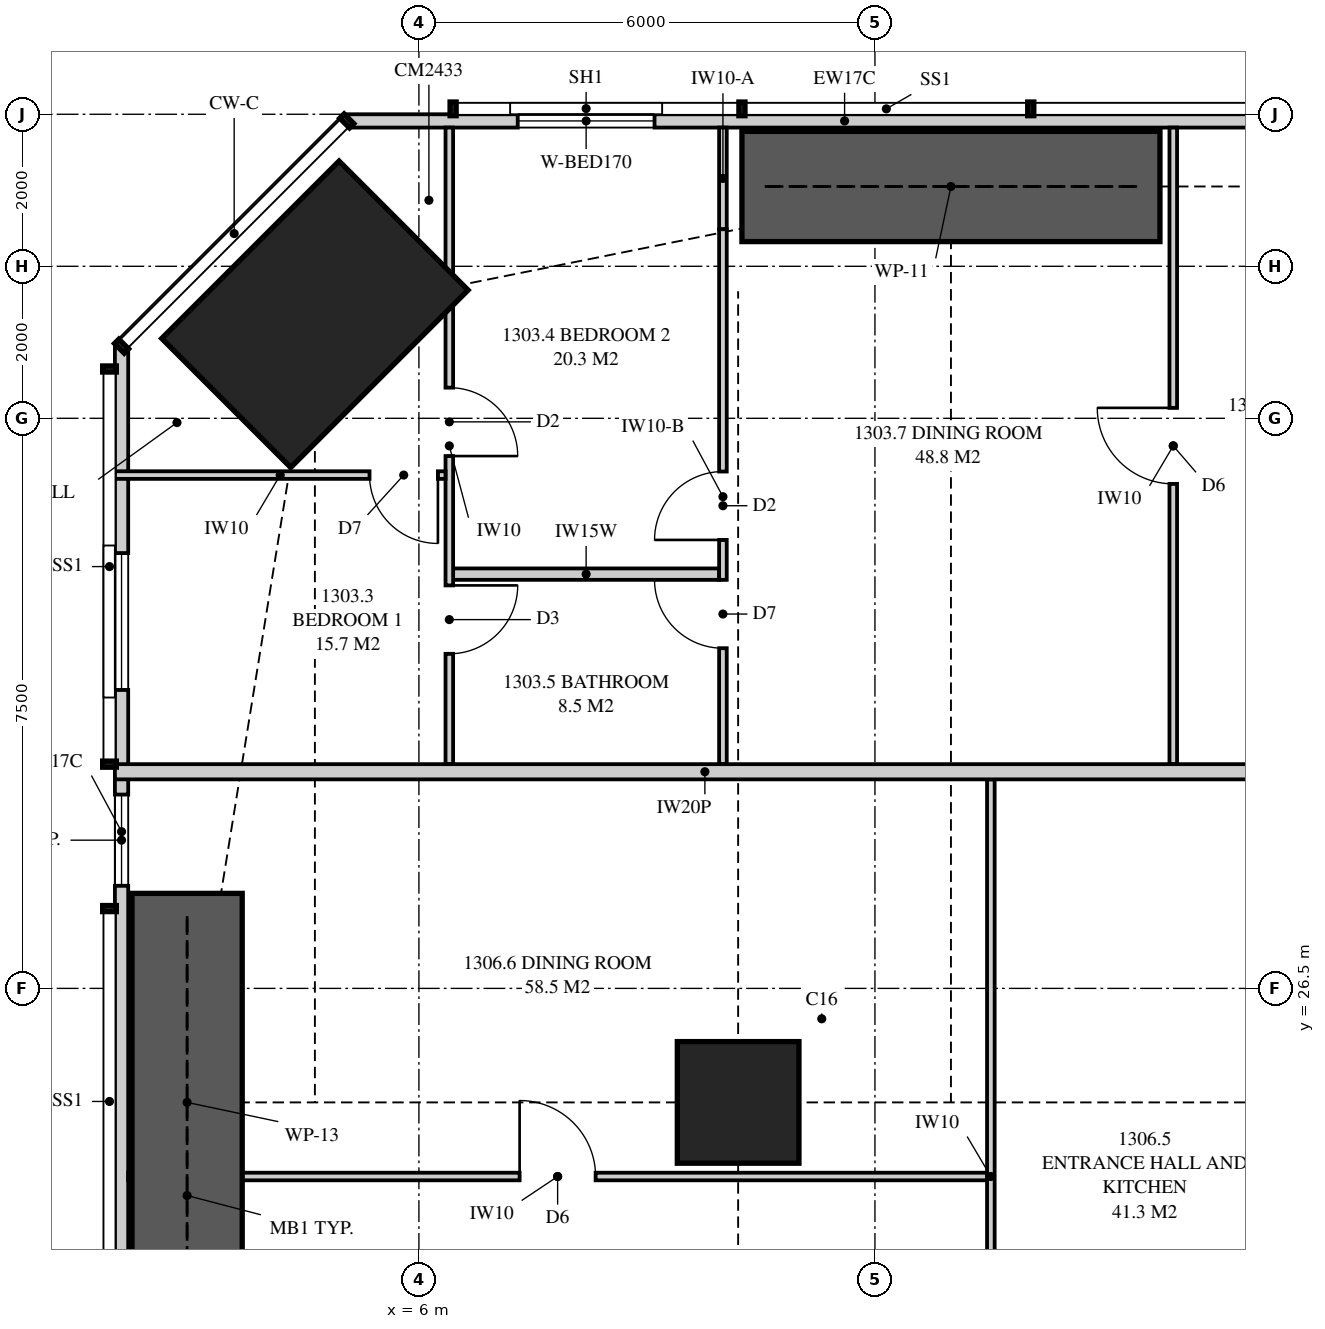
"""IFC4 building model, lengths in metres.
Left out: names, types, materials, properties, quantities, classifications, styles, units other than length and angle.
Written with IfcOpenShell. Run it as: python <this file> out.ifc"""

import sys

from ifc_helpers import new_model, si_unit, direction, frame, frame_2d, origin, origin_2d, place, context, subcontext, project, spatial, polyline, rectangle, outline, extrude, element, fill, save


model = new_model("IFC4")
c1 = context("Model", 3, precision=1e-05, world=origin(), true_north=direction((0.0, 1.0)))
c2 = subcontext(c1, "Body", "Model", "MODEL_VIEW")
j1 = project(units=[si_unit("LENGTHUNIT", "METRE"), si_unit("PLANEANGLEUNIT", "RADIAN")], contexts=[c1])
p1 = place(None, origin())
s1 = spatial("IfcSite", under=j1, at=p1, CompositionType="ELEMENT")
p2 = place(p1, origin())
s2 = spatial("IfcBuilding", under=s1, at=p2, CompositionType="ELEMENT")
p3 = place(p2, frame((0.0, 0.0, 51.15)))
s3 = spatial("IfcBuildingStorey", under=s2, at=p3, CompositionType="ELEMENT", Elevation=51.15)
p4 = place(p3, frame((4.631, 35.369, 0.0), z_axis=(0.0, 0.0, 1.0), x_axis=(0.707106781187, -0.707106781187, 0.0)))
e1 = element("IfcColumn", 1, at=p4, inside=s3, PredefinedType="COLUMN", context=c2, shape_type="SweptSolid", body=[
    extrude(rectangle(XDim=2.4, YDim=3.3, at=origin_2d()), origin(), (0.0, 0.0, 1.0), 3.35),
])
p5 = place(p3, frame((10.2, 25.0, 0.0), z_axis=(0.0, 0.0, 1.0), x_axis=(1.0, 0.0, 0.0)))
e2 = element("IfcColumn", 2, at=p5, inside=s3, PredefinedType="COLUMN", context=c2, shape_type="SweptSolid", body=[
    extrude(rectangle(XDim=1.6, YDim=1.6, at=origin_2d()), origin(), (0.0, 0.0, 1.0), 3.35),
])
p6 = place(p3, frame((18.15, 37.913, 0.0), z_axis=(0.0, 0.0, 1.0), x_axis=(-1.0, 0.0, 0.0)))
e3 = element("IfcWall", 3, at=p6, inside=s3, PredefinedType="SOLIDWALL", context=c2, shape_type="SweptSolid", body=[
    extrude(outline(polyline([(0.0, 0.0), (13.099, 0.0), (13.099, 3.11), (5.354, 3.11), (5.354, 2.15), (5.306, 2.15), (5.306, 3.11), (5.15, 3.11), (5.15, 2.15), (0.0, 2.15), (0.0, 0.0)])), frame((0.0, 0.087, 0.0), z_axis=(0.0, -1.0, 0.0), x_axis=(1.0, 0.0, 0.0)), (0.0, 0.0, 1.0), 0.175),
])
p7 = place(p6, frame((9.05, 0.0, 0.4)))
e4 = element("IfcOpeningElement", 4, at=p7, cuts=e3, PredefinedType="OPENING", context=c2, shape_type="SweptSolid", body=[
    extrude(rectangle(XDim=1.8, YDim=1.7, at=frame_2d((0.9, 0.85))), frame((0.0, 0.097, 0.0), z_axis=(0.0, -1.0, 0.0), x_axis=(1.0, 0.0, 0.0)), (0.0, 0.0, 1.0), 0.195),
])
p8 = place(p3, frame((2.087, 34.949, 0.0), z_axis=(0.0, 0.0, 1.0), x_axis=(0.0, -1.0, 0.0)))
e5 = element("IfcWall", 5, at=p8, inside=s3, PredefinedType="SOLIDWALL", context=c2, shape_type="SweptSolid", body=[
    extrude(outline(polyline([(0.0, 0.0), (12.774, 0.0), (12.774, 2.15), (9.949, 2.15), (9.949, 3.11), (9.823, 3.11), (9.823, 2.15), (9.73, 2.15), (9.73, 3.11), (0.0, 3.11), (0.0, 0.0)])), frame((0.0, 0.087, 0.0), z_axis=(0.0, -1.0, 0.0), x_axis=(1.0, 0.0, 0.0)), (0.0, 0.0, 1.0), 0.175),
])
p9 = place(p8, frame((2.722, 0.0, 0.4)))
e6 = element("IfcOpeningElement", 6, at=p9, cuts=e5, PredefinedType="OPENING", context=c2, shape_type="SweptSolid", body=[
    extrude(rectangle(XDim=1.8, YDim=1.7, at=frame_2d((0.9, 0.85))), frame((0.0, 0.097, 0.0), z_axis=(0.0, -1.0, 0.0), x_axis=(1.0, 0.0, 0.0)), (0.0, 0.0, 1.0), 0.195),
])
p10 = place(p8, frame((5.899, 0.0, 0.4)))
e7 = element("IfcOpeningElement", 7, at=p10, cuts=e5, PredefinedType="OPENING", context=c2, shape_type="SweptSolid", body=[
    extrude(rectangle(XDim=1.2, YDim=1.7, at=frame_2d((0.6, 0.85))), frame((0.0, 0.097, 0.0), z_axis=(0.0, -1.0, 0.0), x_axis=(1.0, 0.0, 0.0)), (0.0, 0.0, 1.0), 0.195),
])
p11 = place(p3, frame((6.4, 37.825, 0.0), z_axis=(0.0, 0.0, 1.0), x_axis=(0.0, -1.0, 0.0)))
e8 = element("IfcWall", 8, at=p11, inside=s3, PredefinedType="PARTITIONING", context=c2, shape_type="SweptSolid", body=[
    extrude(outline(polyline([(0.0, 0.0), (8.375, 0.0), (8.375, 3.11), (2.978, 3.11), (2.978, 2.15), (1.224, 2.15), (1.224, 3.11), (0.0, 3.11), (0.0, 0.0)])), frame((0.0, 0.05, 0.0), z_axis=(0.0, -1.0, 0.0), x_axis=(1.0, 0.0, 0.0)), (0.0, 0.0, 1.0), 0.1),
])
p12 = place(p11, frame((3.422, 0.0, 0.0)))
e9 = element("IfcOpeningElement", 9, at=p12, cuts=e8, PredefinedType="OPENING", context=c2, shape_type="SweptSolid", body=[
    extrude(rectangle(XDim=0.9, YDim=2.1, at=frame_2d((0.45, 1.05))), frame((0.0, 0.06, 0.0), z_axis=(0.0, -1.0, 0.0), x_axis=(1.0, 0.0, 0.0)), (0.0, 0.0, 1.0), 0.12),
])
p13 = place(p11, frame((6.023, 0.0, 0.0)))
e10 = element("IfcOpeningElement", 10, at=p13, cuts=e8, PredefinedType="OPENING", context=c2, shape_type="SweptSolid", body=[
    extrude(rectangle(XDim=0.9, YDim=2.1, at=frame_2d((0.45, 1.05))), frame((0.0, 0.06, 0.0), z_axis=(0.0, -1.0, 0.0), x_axis=(1.0, 0.0, 0.0)), (0.0, 0.0, 1.0), 0.12),
])
p14 = place(p3, frame((10.0, 37.825, 0.0), z_axis=(0.0, 0.0, 1.0), x_axis=(0.0, -1.0, 0.0)))
e11 = element("IfcWall", 11, at=p14, inside=s3, PredefinedType="PARTITIONING", context=c2, shape_type="SweptSolid", body=[
    extrude(outline(polyline([(0.0, 0.0), (1.338, 0.0), (1.338, 2.15), (0.5, 2.15), (0.5, 3.11), (0.0, 3.11), (0.0, 0.0)])), frame((0.0, 0.05, 0.0), z_axis=(0.0, -1.0, 0.0), x_axis=(1.0, 0.0, 0.0)), (0.0, 0.0, 1.0), 0.1),
])
p15 = place(p3, frame((10.0, 36.487, 0.0), z_axis=(0.0, 0.0, 1.0), x_axis=(0.0, -1.0, 0.0)))
e12 = element("IfcWall", 12, at=p15, inside=s3, PredefinedType="PARTITIONING", context=c2, shape_type="SweptSolid", body=[
    extrude(outline(polyline([(0.0, 0.0), (7.037, 0.0), (7.037, 2.51), (0.917, 2.51), (0.917, 2.15), (0.0, 2.15), (0.0, 0.0)])), frame((0.0, 0.05, 0.0), z_axis=(0.0, -1.0, 0.0), x_axis=(1.0, 0.0, 0.0)), (0.0, 0.0, 1.0), 0.1),
])
p16 = place(p15, frame((3.188, 0.0, 0.0)))
e13 = element("IfcOpeningElement", 13, at=p16, cuts=e12, PredefinedType="OPENING", context=c2, shape_type="SweptSolid", body=[
    extrude(rectangle(XDim=0.9, YDim=2.1, at=frame_2d((0.45, 1.05))), frame((0.0, 0.06, 0.0), z_axis=(0.0, -1.0, 0.0), x_axis=(1.0, 0.0, 0.0)), (0.0, 0.0, 1.0), 0.12),
])
p17 = place(p15, frame((4.612, 0.0, 0.0)))
e14 = element("IfcOpeningElement", 14, at=p17, cuts=e12, PredefinedType="OPENING", context=c2, shape_type="SweptSolid", body=[
    extrude(rectangle(XDim=0.9, YDim=2.1, at=frame_2d((0.45, 1.05))), frame((0.0, 0.06, 0.0), z_axis=(0.0, -1.0, 0.0), x_axis=(1.0, 0.0, 0.0)), (0.0, 0.0, 1.0), 0.12),
])
p18 = place(p3, frame((2.0, 33.253, 0.0), z_axis=(0.0, 0.0, 1.0), x_axis=(1.0, 0.0, 0.0)))
e15 = element("IfcWall", 15, at=p18, inside=s3, PredefinedType="PARTITIONING", context=c2, shape_type="SweptSolid", body=[
    extrude(outline(polyline([(0.0, 0.0), (4.35, 0.0), (4.35, 3.11), (3.16, 3.11), (3.16, 2.15), (1.417, 2.15), (1.417, 3.11), (0.0, 3.11), (0.0, 0.0)])), frame((0.0, 0.05, 0.0), z_axis=(0.0, -1.0, 0.0), x_axis=(1.0, 0.0, 0.0)), (0.0, 0.0, 1.0), 0.1),
])
p19 = place(p18, frame((3.35, 0.0, 0.0)))
e16 = element("IfcOpeningElement", 16, at=p19, cuts=e15, PredefinedType="OPENING", context=c2, shape_type="SweptSolid", body=[
    extrude(rectangle(XDim=0.9, YDim=2.1, at=frame_2d((0.45, 1.05))), frame((0.0, 0.06, 0.0), z_axis=(0.0, -1.0, 0.0), x_axis=(1.0, 0.0, 0.0)), (0.0, 0.0, 1.0), 0.12),
])
p20 = place(p3, frame((6.45, 31.95, 0.0), z_axis=(0.0, 0.0, 1.0), x_axis=(1.0, 0.0, 0.0)))
e17 = element("IfcWall", 17, at=p20, inside=s3, PredefinedType="PLUMBINGWALL", context=c2, shape_type="SweptSolid", body=[
    extrude(outline(polyline([(0.0, 0.0), (3.5, 0.0), (3.5, 3.11), (3.5, 2.51), (2.465, 2.51), (2.465, 3.11), (0.0, 3.11), (0.0, 0.0)])), frame((0.0, 0.075, 0.0), z_axis=(0.0, -1.0, 0.0), x_axis=(1.0, 0.0, 0.0)), (0.0, 0.0, 1.0), 0.15),
])
p21 = place(p3, frame((15.925, 37.825, 0.0), z_axis=(0.0, 0.0, 1.0), x_axis=(0.0, -1.0, 0.0)))
e18 = element("IfcWall", 18, at=p21, inside=s3, PredefinedType="PARTITIONING", context=c2, shape_type="SweptSolid", body=[
    extrude(outline(polyline([(0.0, 0.0), (8.375, 0.0), (8.375, 3.11), (1.635, 3.11), (1.635, 2.15), (0.0, 2.15), (0.0, 3.11), (0.0, 0.0)])), frame((0.0, 0.05, 0.0), z_axis=(0.0, -1.0, 0.0), x_axis=(1.0, 0.0, 0.0)), (0.0, 0.0, 1.0), 0.1),
])
p22 = place(p21, frame((3.688, 0.0, 0.0)))
e19 = element("IfcOpeningElement", 19, at=p22, cuts=e18, PredefinedType="OPENING", context=c2, shape_type="SweptSolid", body=[
    extrude(rectangle(XDim=1.0, YDim=2.1, at=frame_2d((0.5, 1.05))), frame((0.0, 0.06, 0.0), z_axis=(0.0, -1.0, 0.0), x_axis=(1.0, 0.0, 0.0)), (0.0, 0.0, 1.0), 0.12),
])
p23 = place(p3, frame((2.0, 29.35, 0.0), z_axis=(0.0, 0.0, 1.0), x_axis=(1.0, 0.0, 0.0)))
e20 = element("IfcWall", 20, at=p23, inside=s3, PredefinedType="PARTITIONING", context=c2, shape_type="SweptSolid", body=[
    extrude(outline(polyline([(0.0, 0.0), (15.525, 0.0), (15.525, 3.11), (11.337, 3.11), (11.337, 2.541), (10.663, 2.541), (10.663, 3.11), (9.51, 3.11), (9.51, 2.51), (6.89, 2.51), (6.89, 3.11), (2.969, 3.11), (2.969, 2.541), (2.577, 2.541), (2.577, 2.15), (0.733, 2.15), (0.733, 3.11), (0.0, 3.11), (0.0, 0.0)])), frame((0.0, 0.1, 0.0), z_axis=(0.0, -1.0, 0.0), x_axis=(1.0, 0.0, 0.0)), (0.0, 0.0, 1.0), 0.2),
])
p24 = place(p3, frame((13.525, 18.8, 0.0), z_axis=(0.0, 0.0, 1.0), x_axis=(0.0, 1.0, 0.0)))
e21 = element("IfcWall", 21, at=p24, inside=s3, PredefinedType="PARTITIONING", context=c2, shape_type="SweptSolid", body=[
    extrude(outline(polyline([(0.0, 0.0), (10.45, 0.0), (10.45, 3.11), (6.487, 3.11), (6.487, 2.541), (5.913, 2.541), (5.913, 3.11), (0.0, 3.11), (0.0, 0.0)])), frame((0.0, 0.05, 0.0), z_axis=(0.0, -1.0, 0.0), x_axis=(1.0, 0.0, 0.0)), (0.0, 0.0, 1.0), 0.1),
])
p25 = place(p24, frame((2.95, 0.0, 0.0)))
e22 = element("IfcOpeningElement", 22, at=p25, cuts=e21, PredefinedType="OPENING", context=c2, shape_type="SweptSolid", body=[
    extrude(rectangle(XDim=1.0, YDim=2.1, at=frame_2d((0.5, 1.05))), frame((0.0, 0.06, 0.0), z_axis=(0.0, -1.0, 0.0), x_axis=(1.0, 0.0, 0.0)), (0.0, 0.0, 1.0), 0.12),
])
p26 = place(p3, frame((2.175, 24.025, 0.0), z_axis=(0.0, 0.0, 1.0), x_axis=(1.0, 0.0, 0.0)))
e23 = element("IfcWall", 23, at=p26, inside=s3, PredefinedType="PARTITIONING", context=c2, shape_type="SweptSolid", body=[
    extrude(outline(polyline([(0.529, 2.15), (0.0, 2.15), (0.0, 0.0), (0.529, 0.0), (0.529, 0.803), (1.021, 0.803), (1.021, 0.0), (11.3, 0.0), (11.3, 3.11), (9.285, 3.11), (9.285, 2.51), (6.765, 2.51), (6.765, 3.11), (1.635, 3.11), (1.635, 2.15), (1.021, 2.15), (1.021, 1.347), (0.529, 1.347), (0.529, 2.15)])), frame((0.0, 0.05, 0.0), z_axis=(0.0, -1.0, 0.0), x_axis=(1.0, 0.0, 0.0)), (0.0, 0.0, 1.0), 0.1),
])
p27 = place(p26, frame((5.15, 0.0, 0.0)))
e24 = element("IfcOpeningElement", 24, at=p27, cuts=e23, PredefinedType="OPENING", context=c2, shape_type="SweptSolid", body=[
    extrude(rectangle(XDim=1.0, YDim=2.1, at=frame_2d((0.5, 1.05))), frame((0.0, 0.06, 0.0), z_axis=(0.0, -1.0, 0.0), x_axis=(1.0, 0.0, 0.0)), (0.0, 0.0, 1.0), 0.12),
])
for number, where, z_axis, x_axis in (
    (25, (10.25, 37.05, 0.0), (0.0, 0.0, 1.0), (1.0, 0.0, 0.0)),
    (26, (2.95, 22.25, 0.0), (0.0, 0.0, 1.0), (0.0, 1.0, 0.0)),
):
    element("IfcWall", number, at=place(p3, frame(where, z_axis=z_axis, x_axis=x_axis)), inside=s3, PredefinedType="SHEAR", context=c2, shape_type="SweptSolid", body=[
        extrude(rectangle(XDim=5.5, YDim=1.45, at=frame_2d((2.75, 0.0))), origin(), (0.0, 0.0, 1.0), 3.35),
    ])
p28 = place(p7, origin())
e27 = element("IfcWindow", 27, at=p28, inside=s3, PartitioningType="SINGLE_PANEL", PredefinedType="WINDOW", context=c2, shape_type="SweptSolid", body=[
    extrude(rectangle(XDim=1.8, YDim=1.7, at=frame_2d((0.9, 0.85))), frame((0.0, 0.03, 0.0), z_axis=(0.0, -1.0, 0.0), x_axis=(1.0, 0.0, 0.0)), (0.0, 0.0, 1.0), 0.06),
])
fill(e4, e27)
p29 = place(p9, origin())
e28 = element("IfcWindow", 28, at=p29, inside=s3, PartitioningType="SINGLE_PANEL", PredefinedType="WINDOW", context=c2, shape_type="SweptSolid", body=[
    extrude(rectangle(XDim=1.8, YDim=1.7, at=frame_2d((0.9, 0.85))), frame((0.0, 0.03, 0.0), z_axis=(0.0, -1.0, 0.0), x_axis=(1.0, 0.0, 0.0)), (0.0, 0.0, 1.0), 0.06),
])
fill(e6, e28)
p30 = place(p10, origin())
e29 = element("IfcWindow", 29, at=p30, inside=s3, PartitioningType="SINGLE_PANEL", PredefinedType="WINDOW", context=c2, shape_type="SweptSolid", body=[
    extrude(rectangle(XDim=1.2, YDim=1.7, at=frame_2d((0.6, 0.85))), frame((0.0, 0.03, 0.0), z_axis=(0.0, -1.0, 0.0), x_axis=(1.0, 0.0, 0.0)), (0.0, 0.0, 1.0), 0.06),
])
fill(e7, e29)
p31 = place(p19, frame((0.9, 0.0, 0.0), z_axis=(0.0, 0.0, 1.0), x_axis=(-1.0, 0.0, 0.0)))
e30 = element("IfcDoor", 30, at=p31, inside=s3, OperationType="SINGLE_SWING_LEFT", PredefinedType="DOOR", context=c2, shape_type="SweptSolid", body=[
    extrude(rectangle(XDim=0.9, YDim=2.1, at=frame_2d((0.45, 1.05))), frame((0.0, 0.025, 0.0), z_axis=(0.0, -1.0, 0.0), x_axis=(1.0, 0.0, 0.0)), (0.0, 0.0, 1.0), 0.05),
])
fill(e16, e30)
p32 = place(p12, origin())
e31 = element("IfcDoor", 31, at=p32, inside=s3, OperationType="SINGLE_SWING_RIGHT", PredefinedType="DOOR", context=c2, shape_type="SweptSolid", body=[
    extrude(rectangle(XDim=0.9, YDim=2.1, at=frame_2d((0.45, 1.05))), frame((0.0, 0.025, 0.0), z_axis=(0.0, -1.0, 0.0), x_axis=(1.0, 0.0, 0.0)), (0.0, 0.0, 1.0), 0.05),
])
fill(e9, e31)
p33 = place(p16, frame((0.9, 0.0, 0.0), z_axis=(0.0, 0.0, 1.0), x_axis=(-1.0, 0.0, 0.0)))
e32 = element("IfcDoor", 32, at=p33, inside=s3, OperationType="SINGLE_SWING_LEFT", PredefinedType="DOOR", context=c2, shape_type="SweptSolid", body=[
    extrude(rectangle(XDim=0.9, YDim=2.1, at=frame_2d((0.45, 1.05))), frame((0.0, 0.025, 0.0), z_axis=(0.0, -1.0, 0.0), x_axis=(1.0, 0.0, 0.0)), (0.0, 0.0, 1.0), 0.05),
])
fill(e13, e32)
p34 = place(p17, frame((0.9, 0.0, 0.0), z_axis=(0.0, 0.0, 1.0), x_axis=(-1.0, 0.0, 0.0)))
e33 = element("IfcDoor", 33, at=p34, inside=s3, OperationType="SINGLE_SWING_RIGHT", PredefinedType="DOOR", context=c2, shape_type="SweptSolid", body=[
    extrude(rectangle(XDim=0.9, YDim=2.1, at=frame_2d((0.45, 1.05))), frame((0.0, 0.025, 0.0), z_axis=(0.0, -1.0, 0.0), x_axis=(1.0, 0.0, 0.0)), (0.0, 0.0, 1.0), 0.05),
])
fill(e14, e33)
p35 = place(p13, origin())
e34 = element("IfcDoor", 34, at=p35, inside=s3, OperationType="SINGLE_SWING_LEFT", PredefinedType="DOOR", context=c2, shape_type="SweptSolid", body=[
    extrude(rectangle(XDim=0.9, YDim=2.1, at=frame_2d((0.45, 1.05))), frame((0.0, 0.025, 0.0), z_axis=(0.0, -1.0, 0.0), x_axis=(1.0, 0.0, 0.0)), (0.0, 0.0, 1.0), 0.05),
])
fill(e10, e34)
p36 = place(p22, frame((1.0, 0.0, 0.0), z_axis=(0.0, 0.0, 1.0), x_axis=(-1.0, 0.0, 0.0)))
e35 = element("IfcDoor", 35, at=p36, inside=s3, OperationType="SINGLE_SWING_RIGHT", PredefinedType="DOOR", context=c2, shape_type="SweptSolid", body=[
    extrude(rectangle(XDim=1.0, YDim=2.1, at=frame_2d((0.5, 1.05))), frame((0.0, 0.025, 0.0), z_axis=(0.0, -1.0, 0.0), x_axis=(1.0, 0.0, 0.0)), (0.0, 0.0, 1.0), 0.05),
])
fill(e19, e35)
p37 = place(p27, origin())
e36 = element("IfcDoor", 36, at=p37, inside=s3, OperationType="SINGLE_SWING_LEFT", PredefinedType="DOOR", context=c2, shape_type="SweptSolid", body=[
    extrude(rectangle(XDim=1.0, YDim=2.1, at=frame_2d((0.5, 1.05))), frame((0.0, 0.025, 0.0), z_axis=(0.0, -1.0, 0.0), x_axis=(1.0, 0.0, 0.0)), (0.0, 0.0, 1.0), 0.05),
])
fill(e24, e36)
save(model, sys.argv[1])
